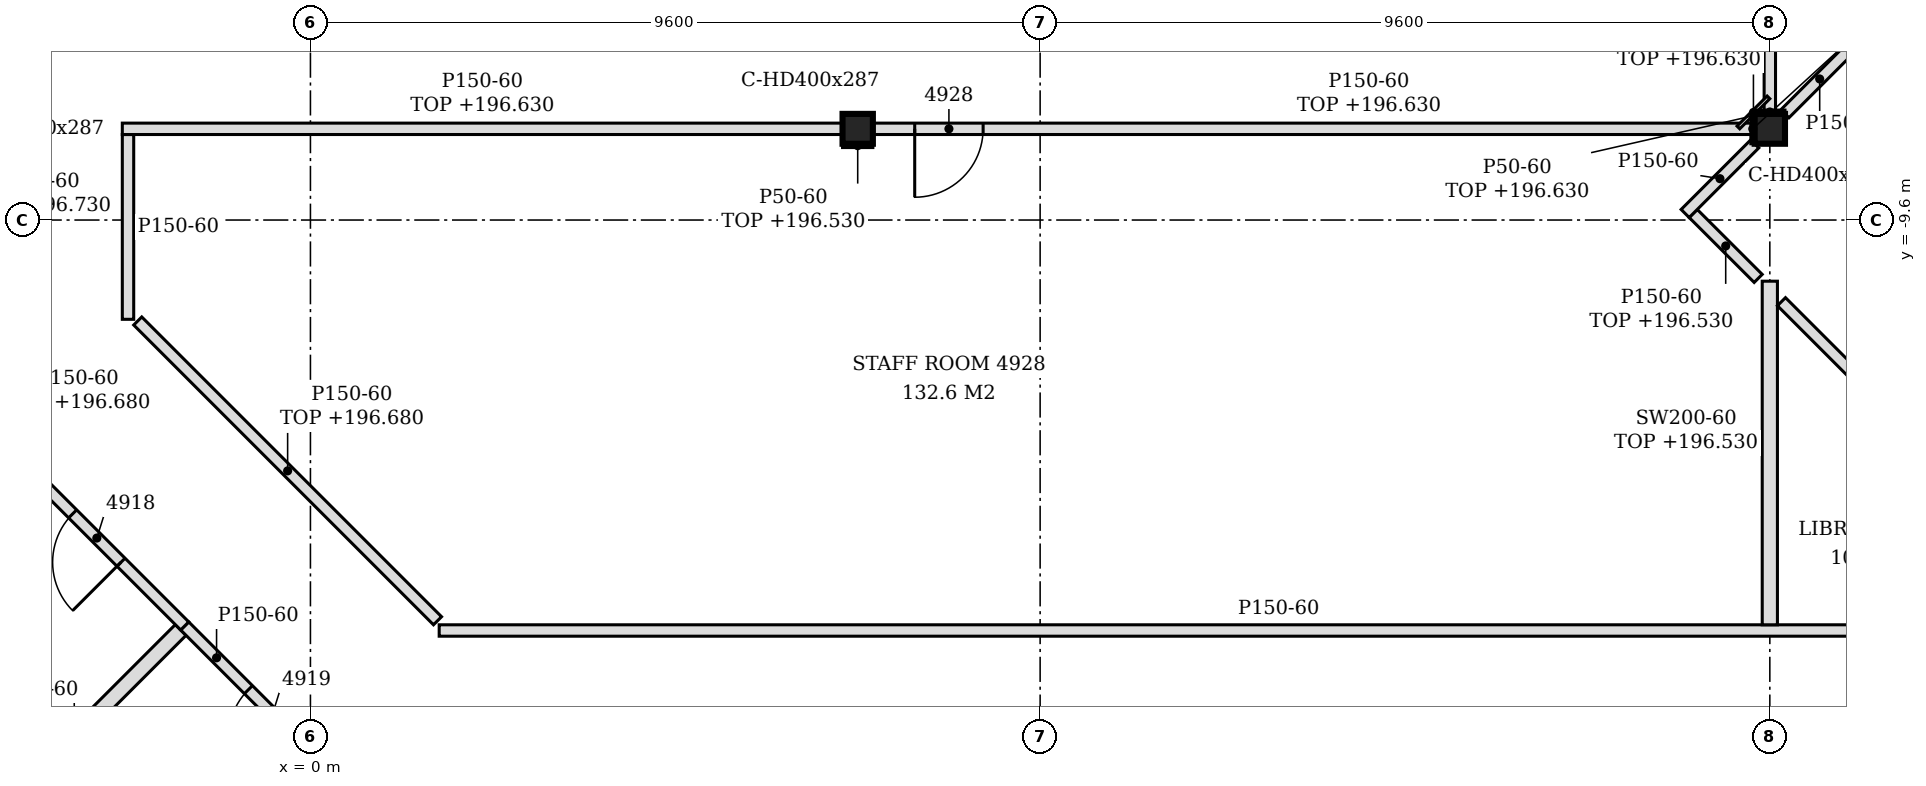
"""IFC4 building model, lengths in metres.
Left out: names, types, materials, properties, quantities, classifications, styles, units other than length and angle.
Written with IfcOpenShell. Run it as: python <this file> out.ifc"""

import sys

from ifc_helpers import new_model, si_unit, direction, frame, frame_2d, origin, origin_2d, place, context, subcontext, project, spatial, polyline, rectangle, i_section, outline, extrude, element, fill, save


model = new_model("IFC4")
c1 = context("Model", 3, precision=1e-05, world=origin(), true_north=direction((0.0, 1.0)))
c2 = subcontext(c1, "Body", "Model", "MODEL_VIEW")
j1 = project(units=[si_unit("LENGTHUNIT", "METRE"), si_unit("PLANEANGLEUNIT", "RADIAN")], contexts=[c1])
p1 = place(None, origin())
s1 = spatial("IfcSite", under=j1, at=p1, CompositionType="ELEMENT")
p2 = place(p1, origin())
s2 = spatial("IfcBuilding", under=s1, at=p2, CompositionType="ELEMENT")
p3 = place(p2, frame((0.0, 0.0, 193.8)))
s3 = spatial("IfcBuildingStorey", under=s2, at=p3, CompositionType="ELEMENT", Elevation=193.8)
for number, where, z_axis, x_axis in (
    (1, (7.2, -8.4, -0.15), (0.0, 0.0, 1.0), (1.0, 0.0, 0.0)),
    (2, (19.2, -8.4, -0.15), (0.0, 0.0, 1.0), (1.0, 0.0, 0.0)),
):
    element("IfcColumn", number, at=place(p3, frame(where, z_axis=z_axis, x_axis=x_axis)), inside=s3, PredefinedType="COLUMN", context=c2, shape_type="SweptSolid", body=[
        extrude(i_section(OverallWidth=0.399, OverallDepth=0.393, WebThickness=0.023, FlangeThickness=0.037, FilletRadius=0.015, at=origin_2d()), origin(), (0.0, 0.0, 1.0), 3.6),
    ])
p4 = place(p3, frame((-4.507, -17.793, 0.0), z_axis=(0.0, 0.0, 1.0), x_axis=(0.707106781187, 0.707106781187, 0.0)))
e3 = element("IfcWall", 3, at=p4, inside=s3, PredefinedType="PARTITIONING", context=c2, shape_type="SweptSolid", body=[
    extrude(rectangle(XDim=3.96, YDim=0.2, at=frame_2d((1.98, 0.0))), origin(), (0.0, 0.0, 1.0), 3.45),
])
p5 = place(p3, frame((0.587, -17.182, 0.0), z_axis=(0.0, 0.0, 1.0), x_axis=(-0.706952760983, 0.707260767849, 0.0)))
e4 = element("IfcWall", 4, at=p5, inside=s3, PredefinedType="PARTITIONING", context=c2, shape_type="SweptSolid", body=[
    extrude(rectangle(XDim=3.171, YDim=0.15, at=frame_2d((1.585, 0.0))), origin(), (0.0, 0.0, 1.0), 3.45),
])
p6 = place(p5, frame((1.085, 0.0, 0.0)))
e5 = element("IfcOpeningElement", 5, at=p6, cuts=e4, PredefinedType="OPENING", context=c2, shape_type="SweptSolid", body=[
    extrude(rectangle(XDim=0.9, YDim=2.1, at=frame_2d((0.45, 1.05))), frame((0.0, 0.085, 0.0), z_axis=(0.0, -1.0, 0.0), x_axis=(1.0, 0.0, 0.0)), (0.0, 0.0, 1.0), 0.17),
])
p7 = place(p3, frame((1.694, -15.0, 0.0), z_axis=(0.0, 0.0, 1.0), x_axis=(1.0, 0.0, 0.0)))
e6 = element("IfcWall", 6, at=p7, inside=s3, PredefinedType="PARTITIONING", context=c2, shape_type="SweptSolid", body=[
    extrude(outline(polyline([(0.0, 0.0), (22.091, 0.0), (22.091, 3.45), (17.656, 3.45), (17.654, 2.73), (17.356, 2.73), (17.354, 3.45), (5.656, 3.45), (5.654, 2.73), (5.356, 2.73), (5.354, 3.45), (0.0, 3.45), (0.0, 0.0)])), frame((0.0, 0.075, 0.0), z_axis=(0.0, -1.0, 0.0), x_axis=(1.0, 0.0, 0.0)), (0.0, 0.0, 1.0), 0.15),
])
p8 = place(p3, frame((-1.654, -14.94, 0.0), z_axis=(0.0, 0.0, 1.0), x_axis=(-0.707106781187, 0.707106781187, 0.0)))
e7 = element("IfcWall", 7, at=p8, inside=s3, PredefinedType="PARTITIONING", context=c2, shape_type="SweptSolid", body=[
    extrude(rectangle(XDim=4.268, YDim=0.15, at=frame_2d((2.134, 0.0))), origin(), (0.0, 0.0, 1.0), 2.88),
])
p9 = place(p8, frame((1.185, 0.0, 0.0)))
e8 = element("IfcOpeningElement", 8, at=p9, cuts=e7, PredefinedType="OPENING", context=c2, shape_type="SweptSolid", body=[
    extrude(rectangle(XDim=0.9, YDim=2.1, at=frame_2d((0.45, 1.05))), frame((0.0, 0.085, 0.0), z_axis=(0.0, -1.0, 0.0), x_axis=(1.0, 0.0, 0.0)), (0.0, 0.0, 1.0), 0.17),
])
p10 = place(p3, frame((1.672, -14.872, 0.0), z_axis=(0.0, 0.0, 1.0), x_axis=(-0.707106781187, 0.707106781187, 0.0)))
e9 = element("IfcWall", 9, at=p10, inside=s3, PredefinedType="PARTITIONING", context=c2, shape_type="SweptSolid", body=[
    extrude(rectangle(XDim=5.578, YDim=0.15, at=frame_2d((2.789, 0.0))), origin(), (0.0, 0.0, 1.0), 2.88),
])
p11 = place(p3, frame((19.2, -14.925, 0.0), z_axis=(0.0, 0.0, 1.0), x_axis=(0.0, 1.0, 0.0)))
e10 = element("IfcWall", 10, at=p11, inside=s3, PredefinedType="PARTITIONING", context=c2, shape_type="SweptSolid", body=[
    extrude(rectangle(XDim=4.521, YDim=0.2, at=frame_2d((2.26, 0.0))), origin(), (0.0, 0.0, 1.0), 2.73),
])
p12 = place(p3, frame((23.551, -14.872, 0.0), z_axis=(0.0, 0.0, 1.0), x_axis=(-0.707106781187, 0.707106781187, 0.0)))
e11 = element("IfcWall", 11, at=p12, inside=s3, PredefinedType="PARTITIONING", context=c2, shape_type="SweptSolid", body=[
    extrude(rectangle(XDim=5.937, YDim=0.15, at=frame_2d((2.968, 0.0))), origin(), (0.0, 0.0, 1.0), 2.73),
])
p13 = place(p12, frame((2.536, 0.0, 0.0)))
e12 = element("IfcOpeningElement", 12, at=p13, cuts=e11, PredefinedType="OPENING", context=c2, shape_type="SweptSolid", body=[
    extrude(rectangle(XDim=0.9, YDim=2.1, at=frame_2d((0.45, 1.05))), frame((0.0, 0.085, 0.0), z_axis=(0.0, -1.0, 0.0), x_axis=(1.0, 0.0, 0.0)), (0.0, 0.0, 1.0), 0.17),
])
p14 = place(p3, frame((-2.4, -10.906, 0.0), z_axis=(0.0, 0.0, 1.0), x_axis=(0.0, 1.0, 0.0)))
e13 = element("IfcWall", 13, at=p14, inside=s3, PredefinedType="PARTITIONING", context=c2, shape_type="SweptSolid", body=[
    extrude(outline(polyline([(0.0, 0.0), (2.431, 0.0), (2.431, 2.83), (2.356, 2.83), (2.354, 3.45), (0.0, 3.45), (0.0, 0.0)])), frame((0.0, 0.075, 0.0), z_axis=(0.0, -1.0, 0.0), x_axis=(1.0, 0.0, 0.0)), (0.0, 0.0, 1.0), 0.15),
])
p15 = place(p3, frame((19.047, -10.368, 0.0), z_axis=(0.0, 0.0, 1.0), x_axis=(-0.707409718716, 0.706803713817, 0.0)))
e14 = element("IfcWall", 14, at=p15, inside=s3, PredefinedType="PARTITIONING", context=c2, shape_type="SweptSolid", body=[
    extrude(rectangle(XDim=1.208, YDim=0.15, at=frame_2d((0.604, 0.0))), origin(), (0.0, 0.0, 1.0), 2.73),
])
p16 = place(p3, frame((18.086, -9.514, 0.0), z_axis=(0.0, 0.0, 1.0), x_axis=(0.707106781187, 0.707106781187, 0.0)))
e15 = element("IfcWall", 15, at=p16, inside=s3, PredefinedType="PARTITIONING", context=c2, shape_type="SweptSolid", body=[
    extrude(rectangle(XDim=1.295, YDim=0.15, at=frame_2d((0.648, 0.0))), origin(), (0.0, 0.0, 1.0), 3.45),
])
p17 = place(p3, frame((-2.475, -8.4, 0.0), z_axis=(0.0, 0.0, 1.0), x_axis=(1.0, 0.0, 0.0)))
e16 = element("IfcWall", 16, at=p17, inside=s3, PredefinedType="PARTITIONING", context=c2, shape_type="SweptSolid", body=[
    extrude(rectangle(XDim=9.476, YDim=0.15, at=frame_2d((4.738, 0.0))), origin(), (0.0, 0.0, 1.0), 2.83),
])
p18 = place(p3, frame((7.399, -8.4, 0.0), z_axis=(0.0, 0.0, 1.0), x_axis=(1.0, 0.0, 0.0)))
e17 = element("IfcWall", 17, at=p18, inside=s3, PredefinedType="PARTITIONING", context=c2, shape_type="SweptSolid", body=[
    extrude(rectangle(XDim=11.601, YDim=0.15, at=frame_2d((5.801, 0.0))), origin(), (0.0, 0.0, 1.0), 2.83),
])
p19 = place(p18, frame((0.551, 0.0, 0.0)))
e18 = element("IfcOpeningElement", 18, at=p19, cuts=e17, PredefinedType="OPENING", context=c2, shape_type="SweptSolid", body=[
    extrude(rectangle(XDim=0.9, YDim=2.1, at=frame_2d((0.45, 1.05))), frame((0.0, 0.085, 0.0), z_axis=(0.0, -1.0, 0.0), x_axis=(1.0, 0.0, 0.0)), (0.0, 0.0, 1.0), 0.17),
])
p20 = place(p3, frame((19.2, -8.204, 0.0), z_axis=(0.0, 0.0, 1.0), x_axis=(0.0, 1.0, 0.0)))
e19 = element("IfcWall", 19, at=p20, inside=s3, PredefinedType="PARTITIONING", context=c2, shape_type="SweptSolid", body=[
    extrude(rectangle(XDim=4.529, YDim=0.15, at=frame_2d((2.264, 0.0))), origin(), (0.0, 0.0, 1.0), 2.83),
])
p21 = place(p3, frame((19.398, -8.202, 0.0), z_axis=(0.0, 0.0, 1.0), x_axis=(0.707200993001, 0.707012556818, 0.0)))
e20 = element("IfcWall", 20, at=p21, inside=s3, PredefinedType="PARTITIONING", context=c2, shape_type="SweptSolid", body=[
    extrude(rectangle(XDim=1.296, YDim=0.15, at=frame_2d((0.648, 0.0))), origin(), (0.0, 0.0, 1.0), 3.45),
])
p22 = place(p3, frame((18.786, -8.382, 0.0), z_axis=(0.0, 0.0, 1.0), x_axis=(0.707106781187, 0.707106781187, 0.0)))
e21 = element("IfcWall", 21, at=p22, inside=s3, PredefinedType="PARTITIONING", context=c2, shape_type="SweptSolid", body=[
    extrude(rectangle(XDim=0.56, YDim=0.05, at=frame_2d((0.28, 0.0))), origin(), (0.0, 0.0, 1.0), 2.83),
])
p23 = place(p3, frame((7.0, -8.622, 0.0), z_axis=(0.0, 0.0, 1.0), x_axis=(1.0, 0.0, 0.0)))
e22 = element("IfcWall", 22, at=p23, inside=s3, PredefinedType="PARTITIONING", context=c2, shape_type="SweptSolid", body=[
    extrude(rectangle(XDim=0.399, YDim=0.05, at=frame_2d((0.199, 0.0))), origin(), (0.0, 0.0, 1.0), 2.73),
])
p24 = place(p3, frame((19.0, -8.178, 0.0), z_axis=(0.0, 0.0, 1.0), x_axis=(1.0, 0.0, 0.0)))
e23 = element("IfcWall", 23, at=p24, inside=s3, PredefinedType="PARTITIONING", context=c2, shape_type="SweptSolid", body=[
    extrude(rectangle(XDim=0.399, YDim=0.05, at=frame_2d((0.199, 0.0))), origin(), (0.0, 0.0, 1.0), 2.83),
])
p25 = place(p3, frame((18.976, -8.596, 0.0), z_axis=(0.0, 0.0, 1.0), x_axis=(0.0, 1.0, 0.0)))
e24 = element("IfcWall", 24, at=p25, inside=s3, PredefinedType="PARTITIONING", context=c2, shape_type="SweptSolid", body=[
    extrude(rectangle(XDim=0.393, YDim=0.05, at=frame_2d((0.196, 0.0))), origin(), (0.0, 0.0, 1.0), 2.83),
])
p26 = place(p9, origin())
e25 = element("IfcDoor", 25, at=p26, inside=s3, OperationType="SINGLE_SWING_LEFT", PredefinedType="DOOR", context=c2, shape_type="SweptSolid", body=[
    extrude(rectangle(XDim=0.9, YDim=2.1, at=frame_2d((0.45, 1.05))), frame((0.0, 0.025, 0.0), z_axis=(0.0, -1.0, 0.0), x_axis=(1.0, 0.0, 0.0)), (0.0, 0.0, 1.0), 0.05),
])
fill(e8, e25)
p27 = place(p6, origin())
e26 = element("IfcDoor", 26, at=p27, inside=s3, OperationType="SINGLE_SWING_LEFT", PredefinedType="DOOR", context=c2, shape_type="SweptSolid", body=[
    extrude(rectangle(XDim=0.9, YDim=2.1, at=frame_2d((0.45, 1.05))), frame((0.0, 0.025, 0.0), z_axis=(0.0, -1.0, 0.0), x_axis=(1.0, 0.0, 0.0)), (0.0, 0.0, 1.0), 0.05),
])
fill(e5, e26)
p28 = place(p19, frame((0.9, 0.0, 0.0), z_axis=(0.0, 0.0, 1.0), x_axis=(-1.0, 0.0, 0.0)))
e27 = element("IfcDoor", 27, at=p28, inside=s3, OperationType="SINGLE_SWING_RIGHT", PredefinedType="DOOR", context=c2, shape_type="SweptSolid", body=[
    extrude(rectangle(XDim=0.9, YDim=2.1, at=frame_2d((0.45, 1.05))), frame((0.0, 0.025, 0.0), z_axis=(0.0, -1.0, 0.0), x_axis=(1.0, 0.0, 0.0)), (0.0, 0.0, 1.0), 0.05),
])
fill(e18, e27)
save(model, sys.argv[1])
